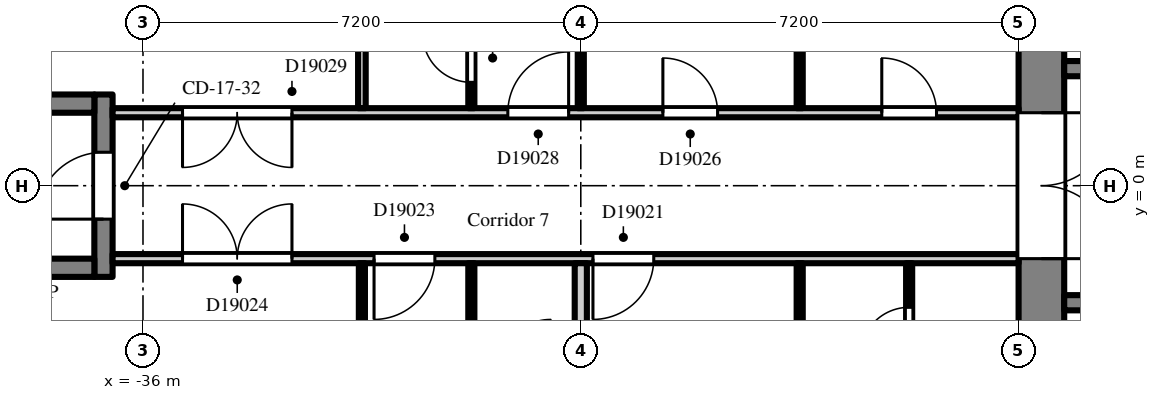
"""IFC4 building model, lengths in metres.
Left out: names, types, materials, properties, quantities, classifications, styles, units other than length and angle.
Written with IfcOpenShell. Run it as: python <this file> out.ifc"""

import sys

from ifc_helpers import new_model, si_unit, direction, frame, frame_2d, origin, place, context, subcontext, project, spatial, rectangle, extrude, element, fill, save


model = new_model("IFC4")
c1 = context("Model", 3, precision=1e-05, world=origin(), true_north=direction((0.0, 1.0)))
c2 = subcontext(c1, "Body", "Model", "MODEL_VIEW")
j1 = project(units=[si_unit("LENGTHUNIT", "METRE"), si_unit("PLANEANGLEUNIT", "RADIAN")], contexts=[c1])
p1 = place(None, origin())
s1 = spatial("IfcSite", under=j1, at=p1, CompositionType="ELEMENT")
p2 = place(p1, origin())
s2 = spatial("IfcBuilding", under=s1, at=p2, CompositionType="ELEMENT")
p3 = place(p2, frame((0.0, 0.0, 129.3)))
s3 = spatial("IfcBuildingStorey", under=s2, at=p3, CompositionType="ELEMENT", Elevation=129.3)
p4 = place(p3, frame((-21.225, -7.2, 0.0), z_axis=(0.0, 0.0, 1.0), x_axis=(0.0, 1.0, 0.0)))
e1 = element("IfcWall", 1, at=p4, inside=s3, PredefinedType="SHEAR", context=c2, shape_type="SweptSolid", body=[
    extrude(rectangle(XDim=14.4, YDim=0.75, at=frame_2d((7.2, 0.0))), origin(), (0.0, 0.0, 1.0), 2.6),
])
p5 = place(p4, frame((6.0, 0.0, 0.0)))
e2 = element("IfcOpeningElement", 2, at=p5, cuts=e1, PredefinedType="OPENING", context=c2, shape_type="SweptSolid", body=[
    extrude(rectangle(XDim=2.4, YDim=2.2, at=frame_2d((1.2, 1.1))), frame((0.0, 0.385, 0.0), z_axis=(0.0, -1.0, 0.0), x_axis=(1.0, 0.0, 0.0)), (0.0, 0.0, 1.0), 0.77),
])
p6 = place(p3, frame((-7.9, 1.925, 0.0), z_axis=(0.0, 0.0, 1.0), x_axis=(-1.0, 0.0, 0.0)))
e3 = element("IfcWall", 3, at=p6, inside=s3, PredefinedType="SHEAR", context=c2, shape_type="SweptSolid", body=[
    extrude(rectangle(XDim=12.95, YDim=0.25, at=frame_2d((6.475, 0.0))), origin(), (0.0, 0.0, 1.0), 2.6),
])
p7 = place(p6, frame((4.825, 0.0, 0.0)))
e4 = element("IfcOpeningElement", 4, at=p7, cuts=e3, PredefinedType="OPENING", context=c2, shape_type="SweptSolid", body=[
    extrude(rectangle(XDim=1.1, YDim=2.1, at=frame_2d((0.55, 1.05))), frame((0.0, 0.135, 0.0), z_axis=(0.0, -1.0, 0.0), x_axis=(1.0, 0.0, 0.0)), (0.0, 0.0, 1.0), 0.27),
])
p8 = place(p6, frame((7.025, 0.0, 0.0)))
e5 = element("IfcOpeningElement", 5, at=p8, cuts=e3, PredefinedType="OPENING", context=c2, shape_type="SweptSolid", body=[
    extrude(rectangle(XDim=1.1, YDim=2.1, at=frame_2d((0.55, 1.05))), frame((0.0, 0.135, 0.0), z_axis=(0.0, -1.0, 0.0), x_axis=(1.0, 0.0, 0.0)), (0.0, 0.0, 1.0), 0.27),
])
p9 = place(p6, frame((9.225, 0.0, 0.0)))
e6 = element("IfcOpeningElement", 6, at=p9, cuts=e3, PredefinedType="OPENING", context=c2, shape_type="SweptSolid", body=[
    extrude(rectangle(XDim=1.1, YDim=2.1, at=frame_2d((0.55, 1.05))), frame((0.0, 0.135, 0.0), z_axis=(0.0, -1.0, 0.0), x_axis=(1.0, 0.0, 0.0)), (0.0, 0.0, 1.0), 0.27),
])
p10 = place(p6, frame((0.525, 0.0, 0.0)))
e7 = element("IfcOpeningElement", 7, at=p10, cuts=e3, PredefinedType="OPENING", context=c2, shape_type="SweptSolid", body=[
    extrude(rectangle(XDim=0.9, YDim=2.1, at=frame_2d((0.45, 1.05))), frame((0.0, 0.135, 0.0), z_axis=(0.0, -1.0, 0.0), x_axis=(1.0, 0.0, 0.0)), (0.0, 0.0, 1.0), 0.27),
])
p11 = place(p6, frame((2.625, 0.0, 0.0)))
e8 = element("IfcOpeningElement", 8, at=p11, cuts=e3, PredefinedType="OPENING", context=c2, shape_type="SweptSolid", body=[
    extrude(rectangle(XDim=1.1, YDim=2.1, at=frame_2d((0.55, 1.05))), frame((0.0, 0.135, 0.0), z_axis=(0.0, -1.0, 0.0), x_axis=(1.0, 0.0, 0.0)), (0.0, 0.0, 1.0), 0.27),
])
p12 = place(p6, frame((11.525, 0.0, 0.0)))
e9 = element("IfcOpeningElement", 9, at=p12, cuts=e3, PredefinedType="OPENING", context=c2, shape_type="SweptSolid", body=[
    extrude(rectangle(XDim=0.9, YDim=2.1, at=frame_2d((0.45, 1.05))), frame((0.0, 0.135, 0.0), z_axis=(0.0, -1.0, 0.0), x_axis=(1.0, 0.0, 0.0)), (0.0, 0.0, 1.0), 0.27),
])
p13 = place(p3, frame((-7.9, -1.925, 0.0), z_axis=(0.0, 0.0, 1.0), x_axis=(-1.0, 0.0, 0.0)))
e10 = element("IfcWall", 10, at=p13, inside=s3, PredefinedType="SHEAR", context=c2, shape_type="SweptSolid", body=[
    extrude(rectangle(XDim=12.95, YDim=0.25, at=frame_2d((6.475, 0.0))), origin(), (0.0, 0.0, 1.0), 2.6),
])
p14 = place(p13, frame((0.525, 0.0, 0.0)))
e11 = element("IfcOpeningElement", 11, at=p14, cuts=e10, PredefinedType="OPENING", context=c2, shape_type="SweptSolid", body=[
    extrude(rectangle(XDim=0.9, YDim=2.1, at=frame_2d((0.45, 1.05))), frame((0.0, 0.135, 0.0), z_axis=(0.0, -1.0, 0.0), x_axis=(1.0, 0.0, 0.0)), (0.0, 0.0, 1.0), 0.27),
])
p15 = place(p13, frame((2.625, 0.0, 0.0)))
e12 = element("IfcOpeningElement", 12, at=p15, cuts=e10, PredefinedType="OPENING", context=c2, shape_type="SweptSolid", body=[
    extrude(rectangle(XDim=1.1, YDim=2.1, at=frame_2d((0.55, 1.05))), frame((0.0, 0.135, 0.0), z_axis=(0.0, -1.0, 0.0), x_axis=(1.0, 0.0, 0.0)), (0.0, 0.0, 1.0), 0.27),
])
p16 = place(p13, frame((8.225, 0.0, 0.0)))
e13 = element("IfcOpeningElement", 13, at=p16, cuts=e10, PredefinedType="OPENING", context=c2, shape_type="SweptSolid", body=[
    extrude(rectangle(XDim=0.9, YDim=2.1, at=frame_2d((0.45, 1.05))), frame((0.0, 0.135, 0.0), z_axis=(0.0, -1.0, 0.0), x_axis=(1.0, 0.0, 0.0)), (0.0, 0.0, 1.0), 0.27),
])
p17 = place(p3, frame((-36.65, -1.5, 0.0), z_axis=(0.0, 0.0, 1.0), x_axis=(0.0, 1.0, 0.0)))
e14 = element("IfcWall", 14, at=p17, inside=s3, PredefinedType="SHEAR", context=c2, shape_type="SweptSolid", body=[
    extrude(rectangle(XDim=3.0, YDim=0.3, at=frame_2d((1.5, 0.0))), origin(), (0.0, 0.0, 1.0), 2.6),
])
p18 = place(p17, frame((0.95, 0.0, 0.0)))
e15 = element("IfcOpeningElement", 15, at=p18, cuts=e14, PredefinedType="OPENING", context=c2, shape_type="SweptSolid", body=[
    extrude(rectangle(XDim=1.1, YDim=2.1, at=frame_2d((0.55, 1.05))), frame((0.0, 0.16, 0.0), z_axis=(0.0, -1.0, 0.0), x_axis=(1.0, 0.0, 0.0)), (0.0, 0.0, 1.0), 0.32),
])
for number, where, z_axis, x_axis in (
    (16, (-36.8, -1.35, 0.0), (0.0, 0.0, 1.0), (-1.0, 0.0, 0.0)),
    (17, (-36.8, 1.35, 0.0), (0.0, 0.0, 1.0), (-1.0, 0.0, 0.0)),
):
    element("IfcWall", number, at=place(p3, frame(where, z_axis=z_axis, x_axis=x_axis)), inside=s3, PredefinedType="SHEAR", context=c2, shape_type="SweptSolid", body=[
        extrude(rectangle(XDim=5.8, YDim=0.3, at=frame_2d((2.9, 0.0))), origin(), (0.0, 0.0, 1.0), 2.6),
    ])
p19 = place(p3, frame((-36.5, -1.2, 0.0), z_axis=(0.0, 0.0, 1.0), x_axis=(1.0, 0.0, 0.0)))
e18 = element("IfcWall", 18, at=p19, inside=s3, PredefinedType="PARTITIONING", context=c2, shape_type="SweptSolid", body=[
    extrude(rectangle(XDim=14.9, YDim=0.15, at=frame_2d((7.45, 0.0))), origin(), (0.0, 0.0, 1.0), 2.6),
])
p20 = place(p19, frame((7.9, 0.0, 0.0)))
e19 = element("IfcOpeningElement", 19, at=p20, cuts=e18, PredefinedType="OPENING", context=c2, shape_type="SweptSolid", body=[
    extrude(rectangle(XDim=1.0, YDim=2.1, at=frame_2d((0.5, 1.05))), frame((0.0, 0.085, 0.0), z_axis=(0.0, -1.0, 0.0), x_axis=(1.0, 0.0, 0.0)), (0.0, 0.0, 1.0), 0.17),
])
p21 = place(p19, frame((4.3, 0.0, 0.0)))
e20 = element("IfcOpeningElement", 20, at=p21, cuts=e18, PredefinedType="OPENING", context=c2, shape_type="SweptSolid", body=[
    extrude(rectangle(XDim=1.0, YDim=2.1, at=frame_2d((0.5, 1.05))), frame((0.0, 0.085, 0.0), z_axis=(0.0, -1.0, 0.0), x_axis=(1.0, 0.0, 0.0)), (0.0, 0.0, 1.0), 0.17),
])
p22 = place(p19, frame((1.15, 0.0, 0.0)))
e21 = element("IfcOpeningElement", 21, at=p22, cuts=e18, PredefinedType="OPENING", context=c2, shape_type="SweptSolid", body=[
    extrude(rectangle(XDim=1.8, YDim=2.1, at=frame_2d((0.9, 1.05))), frame((0.0, 0.085, 0.0), z_axis=(0.0, -1.0, 0.0), x_axis=(1.0, 0.0, 0.0)), (0.0, 0.0, 1.0), 0.17),
])
p23 = place(p3, frame((-36.5, 1.2, 0.0), z_axis=(0.0, 0.0, 1.0), x_axis=(1.0, 0.0, 0.0)))
e22 = element("IfcWall", 22, at=p23, inside=s3, PredefinedType="PARTITIONING", context=c2, shape_type="SweptSolid", body=[
    extrude(rectangle(XDim=14.9, YDim=0.15, at=frame_2d((7.45, 0.0))), origin(), (0.0, 0.0, 1.0), 2.6),
])
p24 = place(p23, frame((12.65, 0.0, 0.0)))
e23 = element("IfcOpeningElement", 23, at=p24, cuts=e22, PredefinedType="OPENING", context=c2, shape_type="SweptSolid", body=[
    extrude(rectangle(XDim=0.9, YDim=2.1, at=frame_2d((0.45, 1.05))), frame((0.0, 0.085, 0.0), z_axis=(0.0, -1.0, 0.0), x_axis=(1.0, 0.0, 0.0)), (0.0, 0.0, 1.0), 0.17),
])
p25 = place(p23, frame((9.05, 0.0, 0.0)))
e24 = element("IfcOpeningElement", 24, at=p25, cuts=e22, PredefinedType="OPENING", context=c2, shape_type="SweptSolid", body=[
    extrude(rectangle(XDim=0.9, YDim=2.1, at=frame_2d((0.45, 1.05))), frame((0.0, 0.085, 0.0), z_axis=(0.0, -1.0, 0.0), x_axis=(1.0, 0.0, 0.0)), (0.0, 0.0, 1.0), 0.17),
])
p26 = place(p23, frame((6.5, 0.0, 0.0)))
e25 = element("IfcOpeningElement", 25, at=p26, cuts=e22, PredefinedType="OPENING", context=c2, shape_type="SweptSolid", body=[
    extrude(rectangle(XDim=1.0, YDim=2.1, at=frame_2d((0.5, 1.05))), frame((0.0, 0.085, 0.0), z_axis=(0.0, -1.0, 0.0), x_axis=(1.0, 0.0, 0.0)), (0.0, 0.0, 1.0), 0.17),
])
p27 = place(p23, frame((1.15, 0.0, 0.0)))
e26 = element("IfcOpeningElement", 26, at=p27, cuts=e22, PredefinedType="OPENING", context=c2, shape_type="SweptSolid", body=[
    extrude(rectangle(XDim=1.8, YDim=2.1, at=frame_2d((0.9, 1.05))), frame((0.0, 0.085, 0.0), z_axis=(0.0, -1.0, 0.0), x_axis=(1.0, 0.0, 0.0)), (0.0, 0.0, 1.0), 0.17),
])
p28 = place(p3, frame((-32.4, -6.9, 0.0), z_axis=(0.0, 0.0, 1.0), x_axis=(0.0, 1.0, 0.0)))
e27 = element("IfcWall", 27, at=p28, inside=s3, PredefinedType="PARTITIONING", context=c2, shape_type="SweptSolid", body=[
    extrude(rectangle(XDim=5.625, YDim=0.1, at=frame_2d((2.812, 0.0))), origin(), (0.0, 0.0, 1.0), 2.6),
])
p29 = place(p3, frame((-32.4, 1.275, 0.0), z_axis=(0.0, 0.0, 1.0), x_axis=(0.0, 1.0, 0.0)))
e28 = element("IfcWall", 28, at=p29, inside=s3, PredefinedType="PARTITIONING", context=c2, shape_type="SweptSolid", body=[
    extrude(rectangle(XDim=1.725, YDim=0.125, at=frame_2d((0.863, 0.0))), origin(), (0.0, 0.0, 1.0), 2.6),
])
p30 = place(p3, frame((-30.6, -3.05, 0.0), z_axis=(0.0, 0.0, 1.0), x_axis=(0.0, 1.0, 0.0)))
e29 = element("IfcWall", 29, at=p30, inside=s3, PredefinedType="PARTITIONING", context=c2, shape_type="SweptSolid", body=[
    extrude(rectangle(XDim=1.775, YDim=0.1, at=frame_2d((0.888, 0.0))), origin(), (0.0, 0.0, 1.0), 2.6),
])
p31 = place(p3, frame((-30.6, 1.275, 0.0), z_axis=(0.0, 0.0, 1.0), x_axis=(0.0, 1.0, 0.0)))
e30 = element("IfcWall", 30, at=p31, inside=s3, PredefinedType="PARTITIONING", context=c2, shape_type="SweptSolid", body=[
    extrude(rectangle(XDim=1.675, YDim=0.1, at=frame_2d((0.837, 0.0))), origin(), (0.0, 0.0, 1.0), 2.6),
])
p32 = place(p31, frame((0.425, 0.0, 0.0)))
e31 = element("IfcOpeningElement", 31, at=p32, cuts=e30, PredefinedType="OPENING", context=c2, shape_type="SweptSolid", body=[
    extrude(rectangle(XDim=0.8, YDim=2.1, at=frame_2d((0.4, 1.05))), frame((0.0, 0.06, 0.0), z_axis=(0.0, -1.0, 0.0), x_axis=(1.0, 0.0, 0.0)), (0.0, 0.0, 1.0), 0.12),
])
p33 = place(p3, frame((-28.8, -6.9, 0.0), z_axis=(0.0, 0.0, 1.0), x_axis=(0.0, 1.0, 0.0)))
e32 = element("IfcWall", 32, at=p33, inside=s3, PredefinedType="PARTITIONING", context=c2, shape_type="SweptSolid", body=[
    extrude(rectangle(XDim=5.625, YDim=0.2, at=frame_2d((2.812, 0.0))), origin(), (0.0, 0.0, 1.0), 2.6),
])
p34 = place(p3, frame((-28.8, 1.275, 0.0), z_axis=(0.0, 0.0, 1.0), x_axis=(0.0, 1.0, 0.0)))
e33 = element("IfcWall", 33, at=p34, inside=s3, PredefinedType="PARTITIONING", context=c2, shape_type="SweptSolid", body=[
    extrude(rectangle(XDim=5.625, YDim=0.1, at=frame_2d((2.812, 0.0))), origin(), (0.0, 0.0, 1.0), 2.6),
])
p35 = place(p3, frame((-25.2, -3.65, 0.0), z_axis=(0.0, 0.0, 1.0), x_axis=(0.0, 1.0, 0.0)))
e34 = element("IfcWall", 34, at=p35, inside=s3, PredefinedType="PARTITIONING", context=c2, shape_type="SweptSolid", body=[
    extrude(rectangle(XDim=2.375, YDim=0.1, at=frame_2d((1.188, 0.0))), origin(), (0.0, 0.0, 1.0), 2.6),
])
p36 = place(p3, frame((-25.2, 1.275, 0.0), z_axis=(0.0, 0.0, 1.0), x_axis=(0.0, 1.0, 0.0)))
e35 = element("IfcWall", 35, at=p36, inside=s3, PredefinedType="PARTITIONING", context=c2, shape_type="SweptSolid", body=[
    extrude(rectangle(XDim=5.625, YDim=0.1, at=frame_2d((2.812, 0.0))), origin(), (0.0, 0.0, 1.0), 2.6),
])
p37 = place(p3, frame((-23.4, -3.55, 0.0), z_axis=(0.0, 0.0, 1.0), x_axis=(0.0, 1.0, 0.0)))
e36 = element("IfcWall", 36, at=p37, inside=s3, PredefinedType="PARTITIONING", context=c2, shape_type="SweptSolid", body=[
    extrude(rectangle(XDim=2.275, YDim=0.1, at=frame_2d((1.138, 0.0))), origin(), (0.0, 0.0, 1.0), 2.6),
])
p38 = place(p37, frame((0.75, 0.0, 0.0)))
e37 = element("IfcOpeningElement", 37, at=p38, cuts=e36, PredefinedType="OPENING", context=c2, shape_type="SweptSolid", body=[
    extrude(rectangle(XDim=0.8, YDim=2.1, at=frame_2d((0.4, 1.05))), frame((0.0, 0.06, 0.0), z_axis=(0.0, -1.0, 0.0), x_axis=(1.0, 0.0, 0.0)), (0.0, 0.0, 1.0), 0.12),
])
p39 = place(p5, frame((2.4, 0.0, 0.0), z_axis=(0.0, 0.0, 1.0), x_axis=(-1.0, 0.0, 0.0)))
e38 = element("IfcDoor", 38, at=p39, inside=s3, OperationType="DOUBLE_DOOR_DOUBLE_SWING", PredefinedType="DOOR", context=c2, shape_type="SweptSolid", body=[
    extrude(rectangle(XDim=2.4, YDim=2.2, at=frame_2d((1.2, 1.1))), frame((0.0, 0.025, 0.0), z_axis=(0.0, -1.0, 0.0), x_axis=(1.0, 0.0, 0.0)), (0.0, 0.0, 1.0), 0.05),
])
fill(e2, e38)
p40 = place(p18, origin())
e39 = element("IfcDoor", 39, at=p40, inside=s3, OperationType="SINGLE_SWING_LEFT", PredefinedType="DOOR", context=c2, shape_type="SweptSolid", body=[
    extrude(rectangle(XDim=1.1, YDim=2.1, at=frame_2d((0.55, 1.05))), frame((0.0, 0.025, 0.0), z_axis=(0.0, -1.0, 0.0), x_axis=(1.0, 0.0, 0.0)), (0.0, 0.0, 1.0), 0.05),
])
fill(e15, e39)
p41 = place(p38, origin())
e40 = element("IfcDoor", 40, at=p41, inside=s3, OperationType="SINGLE_SWING_LEFT", PredefinedType="DOOR", context=c2, shape_type="SweptSolid", body=[
    extrude(rectangle(XDim=0.8, YDim=2.1, at=frame_2d((0.4, 1.05))), frame((0.0, 0.025, 0.0), z_axis=(0.0, -1.0, 0.0), x_axis=(1.0, 0.0, 0.0)), (0.0, 0.0, 1.0), 0.05),
])
fill(e37, e40)
p42 = place(p20, frame((1.0, 0.0, 0.0), z_axis=(0.0, 0.0, 1.0), x_axis=(-1.0, 0.0, 0.0)))
e41 = element("IfcDoor", 41, at=p42, inside=s3, OperationType="SINGLE_SWING_RIGHT", PredefinedType="DOOR", context=c2, shape_type="SweptSolid", body=[
    extrude(rectangle(XDim=1.0, YDim=2.1, at=frame_2d((0.5, 1.05))), frame((0.0, 0.025, 0.0), z_axis=(0.0, -1.0, 0.0), x_axis=(1.0, 0.0, 0.0)), (0.0, 0.0, 1.0), 0.05),
])
fill(e19, e41)
p43 = place(p21, frame((1.0, 0.0, 0.0), z_axis=(0.0, 0.0, 1.0), x_axis=(-1.0, 0.0, 0.0)))
e42 = element("IfcDoor", 42, at=p43, inside=s3, OperationType="SINGLE_SWING_RIGHT", PredefinedType="DOOR", context=c2, shape_type="SweptSolid", body=[
    extrude(rectangle(XDim=1.0, YDim=2.1, at=frame_2d((0.5, 1.05))), frame((0.0, 0.025, 0.0), z_axis=(0.0, -1.0, 0.0), x_axis=(1.0, 0.0, 0.0)), (0.0, 0.0, 1.0), 0.05),
])
fill(e20, e42)
p44 = place(p22, origin())
e43 = element("IfcDoor", 43, at=p44, inside=s3, OperationType="DOUBLE_DOOR_DOUBLE_SWING", PredefinedType="DOOR", context=c2, shape_type="SweptSolid", body=[
    extrude(rectangle(XDim=1.8, YDim=2.1, at=frame_2d((0.9, 1.05))), frame((0.0, 0.025, 0.0), z_axis=(0.0, -1.0, 0.0), x_axis=(1.0, 0.0, 0.0)), (0.0, 0.0, 1.0), 0.05),
])
fill(e21, e43)
p45 = place(p24, origin())
e44 = element("IfcDoor", 44, at=p45, inside=s3, OperationType="SINGLE_SWING_LEFT", PredefinedType="DOOR", context=c2, shape_type="SweptSolid", body=[
    extrude(rectangle(XDim=0.9, YDim=2.1, at=frame_2d((0.45, 1.05))), frame((0.0, 0.025, 0.0), z_axis=(0.0, -1.0, 0.0), x_axis=(1.0, 0.0, 0.0)), (0.0, 0.0, 1.0), 0.05),
])
fill(e23, e44)
p46 = place(p25, origin())
e45 = element("IfcDoor", 45, at=p46, inside=s3, OperationType="SINGLE_SWING_LEFT", PredefinedType="DOOR", context=c2, shape_type="SweptSolid", body=[
    extrude(rectangle(XDim=0.9, YDim=2.1, at=frame_2d((0.45, 1.05))), frame((0.0, 0.025, 0.0), z_axis=(0.0, -1.0, 0.0), x_axis=(1.0, 0.0, 0.0)), (0.0, 0.0, 1.0), 0.05),
])
fill(e24, e45)
p47 = place(p32, origin())
e46 = element("IfcDoor", 46, at=p47, inside=s3, OperationType="SINGLE_SWING_RIGHT", PredefinedType="DOOR", context=c2, shape_type="SweptSolid", body=[
    extrude(rectangle(XDim=0.8, YDim=2.1, at=frame_2d((0.4, 1.05))), frame((0.0, 0.025, 0.0), z_axis=(0.0, -1.0, 0.0), x_axis=(1.0, 0.0, 0.0)), (0.0, 0.0, 1.0), 0.05),
])
fill(e31, e46)
p48 = place(p26, origin())
e47 = element("IfcDoor", 47, at=p48, inside=s3, OperationType="SINGLE_SWING_RIGHT", PredefinedType="DOOR", context=c2, shape_type="SweptSolid", body=[
    extrude(rectangle(XDim=1.0, YDim=2.1, at=frame_2d((0.5, 1.05))), frame((0.0, 0.025, 0.0), z_axis=(0.0, -1.0, 0.0), x_axis=(1.0, 0.0, 0.0)), (0.0, 0.0, 1.0), 0.05),
])
fill(e25, e47)
p49 = place(p27, frame((1.8, 0.0, 0.0), z_axis=(0.0, 0.0, 1.0), x_axis=(-1.0, 0.0, 0.0)))
e48 = element("IfcDoor", 48, at=p49, inside=s3, OperationType="DOUBLE_DOOR_DOUBLE_SWING", PredefinedType="DOOR", context=c2, shape_type="SweptSolid", body=[
    extrude(rectangle(XDim=1.8, YDim=2.1, at=frame_2d((0.9, 1.05))), frame((0.0, 0.025, 0.0), z_axis=(0.0, -1.0, 0.0), x_axis=(1.0, 0.0, 0.0)), (0.0, 0.0, 1.0), 0.05),
])
fill(e26, e48)
save(model, sys.argv[1])
